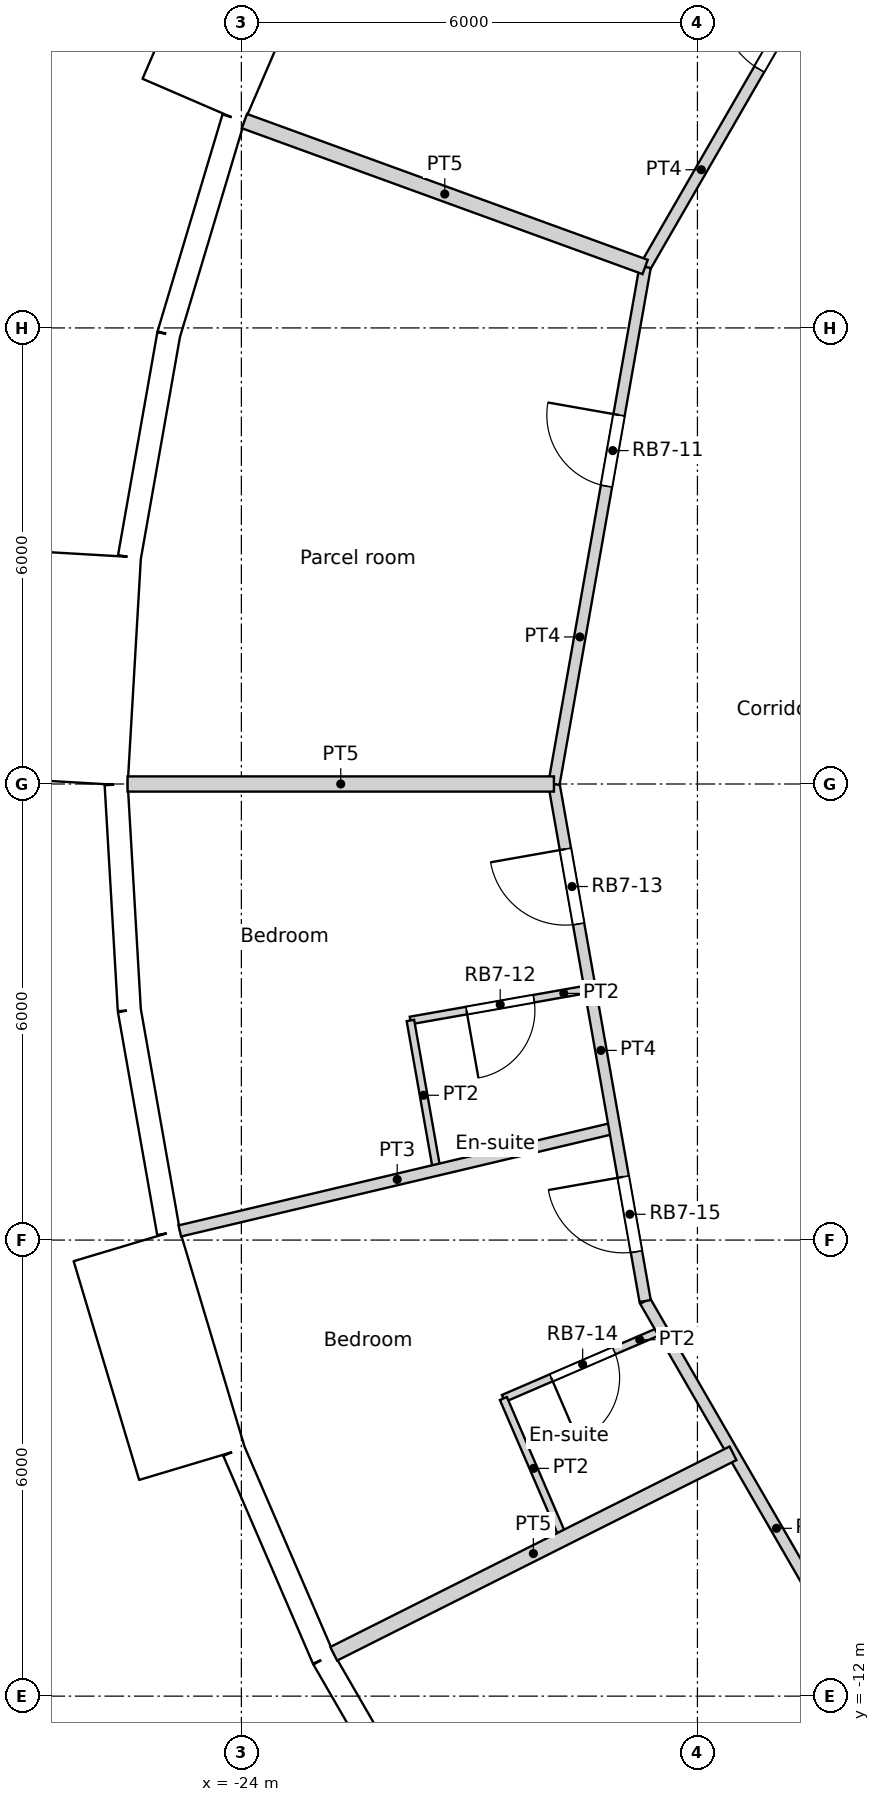
"""IFC4 building model, lengths in metres.
Left out: names, types, materials, properties, quantities, classifications, styles, units other than length and angle.
Written with IfcOpenShell. Run it as: python <this file> out.ifc"""

import sys

from ifc_helpers import new_model, si_unit, direction, frame, frame_2d, origin, origin_2d, place, context, subcontext, project, spatial, rectangle, circle, extrude, element, fill, save


model = new_model("IFC4")
c1 = context("Model", 3, precision=1e-05, world=origin(), true_north=direction((0.0, 1.0)))
c2 = subcontext(c1, "Body", "Model", "MODEL_VIEW")
j1 = project(units=[si_unit("LENGTHUNIT", "METRE"), si_unit("PLANEANGLEUNIT", "RADIAN")], contexts=[c1])
p1 = place(None, origin())
s1 = spatial("IfcSite", under=j1, at=p1, CompositionType="ELEMENT")
p2 = place(p1, origin())
s2 = spatial("IfcBuilding", under=s1, at=p2, CompositionType="ELEMENT")
p3 = place(p2, frame((0.0, 0.0, 190.8)))
s3 = spatial("IfcBuildingStorey", under=s2, at=p3, CompositionType="ELEMENT", Elevation=190.8)
for number, where, z_axis, x_axis in (
    (1, (-23.067, 8.396, 0.0), (0.0, 0.0, 1.0), (1.0, 0.0, 0.0)),
    (2, (-24.382, 2.85, 0.0), (0.0, 0.0, 1.0), (1.0, 0.0, 0.0)),
    (3, (-24.382, -2.85, 0.0), (0.0, 0.0, 1.0), (1.0, 0.0, 0.0)),
    (4, (-23.067, -8.396, 0.0), (0.0, 0.0, 1.0), (1.0, 0.0, 0.0)),
):
    element("IfcColumn", number, at=place(p3, frame(where, z_axis=z_axis, x_axis=x_axis)), inside=s3, PredefinedType="COLUMN", context=c2, shape_type="SweptSolid", body=[
        extrude(circle(Radius=0.6, at=origin_2d()), origin(), (0.0, 0.0, 1.0), 3.6),
    ])
for number, where, z_axis, x_axis in (
    (5, (-16.958, 8.167, 0.0), (0.0, 0.0, 1.0), (1.0, 0.0, 0.0)),
    (6, (-18.612, 2.805, 0.0), (0.0, 0.0, 1.0), (1.0, 0.0, 0.0)),
    (7, (-18.612, -2.805, 0.0), (0.0, 0.0, 1.0), (1.0, 0.0, 0.0)),
    (8, (-16.958, -8.167, 0.0), (0.0, 0.0, 1.0), (1.0, 0.0, 0.0)),
):
    element("IfcColumn", number, at=place(p3, frame(where, z_axis=z_axis, x_axis=x_axis)), inside=s3, PredefinedType="COLUMN", context=c2, shape_type="SweptSolid", body=[
        extrude(circle(Radius=0.65, at=origin_2d()), origin(), (0.0, 0.0, 1.0), 3.6),
    ])
p4 = place(p3, frame((-23.444, 11.746, -0.3), z_axis=(0.0, 0.0, 1.0), x_axis=(-0.396079003245, -0.918216435917, 0.0)))
e9 = element("IfcWall", 9, at=p4, inside=s3, PredefinedType="ELEMENTEDWALL", context=c2, shape_type="SweptSolid", body=[
    extrude(rectangle(XDim=3.0, YDim=1.45, at=frame_2d((1.5, 0.0))), origin(), (0.0, 0.0, 1.0), 3.6),
])
p5 = place(p4, frame((1.5, 0.0, 1.85)))
e10 = element("IfcOpeningElement", 10, at=p5, cuts=e9, PredefinedType="OPENING", context=c2, shape_type="SweptSolid", body=[
    extrude(circle(Radius=0.9, at=origin_2d()), frame((0.0, 0.735, 0.0), z_axis=(0.0, -1.0, 0.0), x_axis=(1.0, 0.0, 0.0)), (0.0, 0.0, 1.0), 1.47),
])
p6 = place(p3, frame((-24.104, 8.763, 0.0), z_axis=(0.0, 0.0, 1.0), x_axis=(-0.286782750849, -0.957995643944, 0.0)))
e11 = element("IfcWall", 11, at=p6, inside=s3, PredefinedType="SOLIDWALL", context=c2, shape_type="SweptSolid", body=[
    extrude(rectangle(XDim=2.973, YDim=0.3, at=frame_2d((1.486, 0.0))), origin(), (0.0, 0.0, 1.0), 2.8),
])
p7 = place(p6, frame((1.486, 0.0, 1.55)))
e12 = element("IfcOpeningElement", 12, at=p7, cuts=e11, PredefinedType="OPENING", context=c2, shape_type="SweptSolid", body=[
    extrude(circle(Radius=0.9, at=origin_2d()), frame((0.0, 0.16, 0.0), z_axis=(0.0, -1.0, 0.0), x_axis=(1.0, 0.0, 0.0)), (0.0, 0.0, 1.0), 0.32),
])
p8 = place(p3, frame((-24.956, 5.915, 0.0), z_axis=(0.0, 0.0, 1.0), x_axis=(-0.173686952598, -0.984800915159, 0.0)))
e13 = element("IfcWall", 13, at=p8, inside=s3, PredefinedType="SOLIDWALL", context=c2, shape_type="SweptSolid", body=[
    extrude(rectangle(XDim=2.973, YDim=0.3, at=frame_2d((1.486, 0.0))), origin(), (0.0, 0.0, 1.0), 3.3),
])
p9 = place(p8, frame((1.486, 0.0, 1.55)))
e14 = element("IfcOpeningElement", 14, at=p9, cuts=e13, PredefinedType="OPENING", context=c2, shape_type="SweptSolid", body=[
    extrude(circle(Radius=0.9, at=origin_2d()), frame((0.0, 0.16, 0.0), z_axis=(0.0, -1.0, 0.0), x_axis=(1.0, 0.0, 0.0)), (0.0, 0.0, 1.0), 0.32),
])
p10 = place(p3, frame((-26.048, 3.02, -0.3), z_axis=(0.0, 0.0, 1.0), x_axis=(-0.058106596105, -0.998310384344, 0.0)))
e15 = element("IfcWall", 15, at=p10, inside=s3, PredefinedType="ELEMENTEDWALL", context=c2, shape_type="SweptSolid", body=[
    extrude(rectangle(XDim=3.0, YDim=1.45, at=frame_2d((1.5, 0.0))), origin(), (0.0, 0.0, 1.0), 3.6),
])
p11 = place(p10, frame((1.5, 0.0, 1.85)))
e16 = element("IfcOpeningElement", 16, at=p11, cuts=e15, PredefinedType="OPENING", context=c2, shape_type="SweptSolid", body=[
    extrude(circle(Radius=0.9, at=origin_2d()), frame((0.0, 0.735, 0.0), z_axis=(0.0, -1.0, 0.0), x_axis=(1.0, 0.0, 0.0)), (0.0, 0.0, 1.0), 1.47),
])
p12 = place(p3, frame((-25.647, -0.01, 0.0), z_axis=(0.0, 0.0, 1.0), x_axis=(0.058139540521, -0.998308466271, 0.0)))
e17 = element("IfcWall", 17, at=p12, inside=s3, PredefinedType="SOLIDWALL", context=c2, shape_type="SweptSolid", body=[
    extrude(rectangle(XDim=2.973, YDim=0.3, at=frame_2d((1.487, 0.0))), origin(), (0.0, 0.0, 1.0), 2.8),
])
p13 = place(p12, frame((1.486, 0.0, 1.55)))
e18 = element("IfcOpeningElement", 18, at=p13, cuts=e17, PredefinedType="OPENING", context=c2, shape_type="SweptSolid", body=[
    extrude(circle(Radius=0.9, at=origin_2d()), frame((0.0, 0.16, 0.0), z_axis=(0.0, -1.0, 0.0), x_axis=(1.0, 0.0, 0.0)), (0.0, 0.0, 1.0), 0.32),
])
p14 = place(p3, frame((-25.474, -2.978, 0.0), z_axis=(0.0, 0.0, 1.0), x_axis=(0.173686952598, -0.984800915159, 0.0)))
e19 = element("IfcWall", 19, at=p14, inside=s3, PredefinedType="SOLIDWALL", context=c2, shape_type="SweptSolid", body=[
    extrude(rectangle(XDim=2.973, YDim=0.3, at=frame_2d((1.486, 0.0))), origin(), (0.0, 0.0, 1.0), 3.3),
])
p15 = place(p14, frame((1.486, 0.0, 1.55)))
e20 = element("IfcOpeningElement", 20, at=p15, cuts=e19, PredefinedType="OPENING", context=c2, shape_type="SweptSolid", body=[
    extrude(circle(Radius=0.9, at=origin_2d()), frame((0.0, 0.16, 0.0), z_axis=(0.0, -1.0, 0.0), x_axis=(1.0, 0.0, 0.0)), (0.0, 0.0, 1.0), 0.32),
])
p16 = place(p3, frame((-25.51, -6.071, -0.3), z_axis=(0.0, 0.0, 1.0), x_axis=(0.286780420304, -0.957996341606, 0.0)))
e21 = element("IfcWall", 21, at=p16, inside=s3, PredefinedType="ELEMENTEDWALL", context=c2, shape_type="SweptSolid", body=[
    extrude(rectangle(XDim=3.0, YDim=1.45, at=frame_2d((1.5, 0.0))), origin(), (0.0, 0.0, 1.0), 3.6),
])
p17 = place(p16, frame((1.5, 0.0, 1.85)))
e22 = element("IfcOpeningElement", 22, at=p17, cuts=e21, PredefinedType="OPENING", context=c2, shape_type="SweptSolid", body=[
    extrude(circle(Radius=0.9, at=origin_2d()), frame((0.0, 0.735, 0.0), z_axis=(0.0, -1.0, 0.0), x_axis=(1.0, 0.0, 0.0)), (0.0, 0.0, 1.0), 1.47),
])
p18 = place(p3, frame((-24.097, -8.781, 0.0), z_axis=(0.0, 0.0, 1.0), x_axis=(0.396078892785, -0.918216483565, 0.0)))
e23 = element("IfcWall", 23, at=p18, inside=s3, PredefinedType="SOLIDWALL", context=c2, shape_type="SweptSolid", body=[
    extrude(rectangle(XDim=2.973, YDim=0.3, at=frame_2d((1.486, 0.0))), origin(), (0.0, 0.0, 1.0), 2.8),
])
p19 = place(p18, frame((1.486, 0.0, 1.55)))
e24 = element("IfcOpeningElement", 24, at=p19, cuts=e23, PredefinedType="OPENING", context=c2, shape_type="SweptSolid", body=[
    extrude(circle(Radius=0.9, at=origin_2d()), frame((0.0, 0.16, 0.0), z_axis=(0.0, -1.0, 0.0), x_axis=(1.0, 0.0, 0.0)), (0.0, 0.0, 1.0), 0.32),
])
p20 = place(p3, frame((-22.919, -11.51, 0.0), z_axis=(0.0, 0.0, 1.0), x_axis=(0.500016263033, -0.866016014115, 0.0)))
e25 = element("IfcWall", 25, at=p20, inside=s3, PredefinedType="SOLIDWALL", context=c2, shape_type="SweptSolid", body=[
    extrude(rectangle(XDim=2.973, YDim=0.3, at=frame_2d((1.487, 0.0))), origin(), (0.0, 0.0, 1.0), 3.3),
])
p21 = place(p20, frame((1.486, 0.0, 1.55)))
e26 = element("IfcOpeningElement", 26, at=p21, cuts=e25, PredefinedType="OPENING", context=c2, shape_type="SweptSolid", body=[
    extrude(circle(Radius=0.9, at=origin_2d()), frame((0.0, 0.16, 0.0), z_axis=(0.0, -1.0, 0.0), x_axis=(1.0, 0.0, 0.0)), (0.0, 0.0, 1.0), 0.32),
])
p22 = place(p3, frame((-18.688, 6.802, 0.0), z_axis=(0.0, 0.0, 1.0), x_axis=(0.499914202267, 0.866074933462, 0.0)))
e27 = element("IfcWall", 27, at=p22, inside=s3, PredefinedType="PARTITIONING", context=c2, shape_type="SweptSolid", body=[
    extrude(rectangle(XDim=6.907, YDim=0.15, at=frame_2d((3.454, 0.0))), origin(), (0.0, 0.0, 1.0), 3.3),
])
p23 = place(p22, frame((3.004, 0.0, 0.0)))
e28 = element("IfcOpeningElement", 28, at=p23, cuts=e27, PredefinedType="OPENING", context=c2, shape_type="SweptSolid", body=[
    extrude(rectangle(XDim=1.0, YDim=2.04, at=frame_2d((0.5, 1.02))), frame((0.0, 0.075, 0.0), z_axis=(0.0, -1.0, 0.0), x_axis=(1.0, 0.0, 0.0)), (0.0, 0.0, 1.0), 0.15),
])
p24 = place(p3, frame((-19.888, 0.0, 0.0), z_axis=(0.0, 0.0, 1.0), x_axis=(0.173728873845, 0.98479352069, 0.0)))
e29 = element("IfcWall", 29, at=p24, inside=s3, PredefinedType="PARTITIONING", context=c2, shape_type="SweptSolid", body=[
    extrude(rectangle(XDim=6.907, YDim=0.15, at=frame_2d((3.454, 0.0))), origin(), (0.0, 0.0, 1.0), 3.3),
])
p25 = place(p24, frame((3.979, 0.0, 0.0)))
e30 = element("IfcOpeningElement", 30, at=p25, cuts=e29, PredefinedType="OPENING", context=c2, shape_type="SweptSolid", body=[
    extrude(rectangle(XDim=0.95, YDim=2.1, at=frame_2d((0.475, 1.05))), frame((0.0, 0.075, 0.0), z_axis=(0.0, -1.0, 0.0), x_axis=(1.0, 0.0, 0.0)), (0.0, 0.0, 1.0), 0.15),
])
p26 = place(p3, frame((-19.888, 0.0, 0.0), z_axis=(0.0, 0.0, 1.0), x_axis=(0.173728873845, -0.98479352069, 0.0)))
e31 = element("IfcWall", 31, at=p26, inside=s3, PredefinedType="PARTITIONING", context=c2, shape_type="SweptSolid", body=[
    extrude(rectangle(XDim=6.907, YDim=0.15, at=frame_2d((3.454, 0.0))), origin(), (0.0, 0.0, 1.0), 3.3),
])
p27 = place(p26, frame((0.87, 0.0, 0.0)))
e32 = element("IfcOpeningElement", 32, at=p27, cuts=e31, PredefinedType="OPENING", context=c2, shape_type="SweptSolid", body=[
    extrude(rectangle(XDim=1.0, YDim=2.1, at=frame_2d((0.5, 1.05))), frame((0.0, 0.075, 0.0), z_axis=(0.0, -1.0, 0.0), x_axis=(1.0, 0.0, 0.0)), (0.0, 0.0, 1.0), 0.15),
])
p28 = place(p26, frame((5.248, 0.0, 0.0)))
e33 = element("IfcOpeningElement", 33, at=p28, cuts=e31, PredefinedType="OPENING", context=c2, shape_type="SweptSolid", body=[
    extrude(rectangle(XDim=1.0, YDim=2.1, at=frame_2d((0.5, 1.05))), frame((0.0, 0.075, 0.0), z_axis=(0.0, -1.0, 0.0), x_axis=(1.0, 0.0, 0.0)), (0.0, 0.0, 1.0), 0.15),
])
p29 = place(p3, frame((-18.688, -6.802, 0.0), z_axis=(0.0, 0.0, 1.0), x_axis=(0.500229307554, -0.865892972523, 0.0)))
e34 = element("IfcWall", 34, at=p29, inside=s3, PredefinedType="PARTITIONING", context=c2, shape_type="SweptSolid", body=[
    extrude(rectangle(XDim=6.907, YDim=0.15, at=frame_2d((3.454, 0.0))), origin(), (0.0, 0.0, 1.0), 3.3),
])
p30 = place(p3, frame((-23.96, 8.721, 0.0), z_axis=(0.0, 0.0, 1.0), x_axis=(0.939686652043, -0.342036541866, 0.0)))
e35 = element("IfcWall", 35, at=p30, inside=s3, PredefinedType="PARTITIONING", context=c2, shape_type="SweptSolid", body=[
    extrude(rectangle(XDim=5.61, YDim=0.2, at=frame_2d((2.805, 0.0))), origin(), (0.0, 0.0, 1.0), 3.3),
])
p31 = place(p3, frame((-25.497, 0.0, 0.0), z_axis=(0.0, 0.0, 1.0), x_axis=(1.0, 0.0, 0.0)))
e36 = element("IfcWall", 36, at=p31, inside=s3, PredefinedType="PARTITIONING", context=c2, shape_type="SweptSolid", body=[
    extrude(rectangle(XDim=5.609, YDim=0.2, at=frame_2d((2.805, 0.0))), origin(), (0.0, 0.0, 1.0), 3.3),
])
p32 = place(p3, frame((-21.776, -3.111, 0.0), z_axis=(0.0, 0.0, 1.0), x_axis=(0.984781509998, 0.173796943488, 0.0)))
e37 = element("IfcWall", 37, at=p32, inside=s3, PredefinedType="PARTITIONING", context=c2, shape_type="SweptSolid", body=[
    extrude(rectangle(XDim=2.399, YDim=0.1, at=frame_2d((1.2, 0.0))), origin(), (0.0, 0.0, 1.0), 3.3),
])
p33 = place(p32, frame((0.75, 0.0, 0.0)))
e38 = element("IfcOpeningElement", 38, at=p33, cuts=e37, PredefinedType="OPENING", context=c2, shape_type="SweptSolid", body=[
    extrude(rectangle(XDim=0.9, YDim=2.04, at=frame_2d((0.45, 1.02))), frame((0.0, 0.05, 0.0), z_axis=(0.0, -1.0, 0.0), x_axis=(1.0, 0.0, 0.0)), (0.0, 0.0, 1.0), 0.1),
])
p34 = place(p3, frame((-21.776, -3.111, 0.0), z_axis=(0.0, 0.0, 1.0), x_axis=(0.17360412522, -0.984815519631, 0.0)))
e39 = element("IfcWall", 39, at=p34, inside=s3, PredefinedType="PARTITIONING", context=c2, shape_type="SweptSolid", body=[
    extrude(rectangle(XDim=1.998, YDim=0.1, at=frame_2d((0.999, 0.0))), origin(), (0.0, 0.0, 1.0), 3.3),
])
p35 = place(p3, frame((-24.81, -5.88, 0.0), z_axis=(0.0, 0.0, 1.0), x_axis=(0.973072933953, 0.230497429938, 0.0)))
e40 = element("IfcWall", 40, at=p35, inside=s3, PredefinedType="PARTITIONING", context=c2, shape_type="SweptSolid", body=[
    extrude(rectangle(XDim=5.878, YDim=0.15, at=frame_2d((2.939, 0.0))), origin(), (0.0, 0.0, 1.0), 3.3),
])
p36 = place(p3, frame((-20.553, -8.084, 0.0), z_axis=(0.0, 0.0, 1.0), x_axis=(0.918353723737, 0.395760581789, 0.0)))
e41 = element("IfcWall", 41, at=p36, inside=s3, PredefinedType="PARTITIONING", context=c2, shape_type="SweptSolid", body=[
    extrude(rectangle(XDim=2.271, YDim=0.1, at=frame_2d((1.136, 0.0))), origin(), (0.0, 0.0, 1.0), 3.3),
])
p37 = place(p36, frame((0.686, 0.0, 0.0)))
e42 = element("IfcOpeningElement", 42, at=p37, cuts=e41, PredefinedType="OPENING", context=c2, shape_type="SweptSolid", body=[
    extrude(rectangle(XDim=0.9, YDim=2.04, at=frame_2d((0.45, 1.02))), frame((0.0, 0.05, 0.0), z_axis=(0.0, -1.0, 0.0), x_axis=(1.0, 0.0, 0.0)), (0.0, 0.0, 1.0), 0.1),
])
p38 = place(p3, frame((-20.553, -8.084, 0.0), z_axis=(0.0, 0.0, 1.0), x_axis=(0.395756708969, -0.918355392703, 0.0)))
e43 = element("IfcWall", 43, at=p38, inside=s3, PredefinedType="PARTITIONING", context=c2, shape_type="SweptSolid", body=[
    extrude(rectangle(XDim=2.004, YDim=0.1, at=frame_2d((1.002, 0.0))), origin(), (0.0, 0.0, 1.0), 3.3),
])
p39 = place(p3, frame((-22.785, -11.443, 0.0), z_axis=(0.0, 0.0, 1.0), x_axis=(0.893644988933, 0.448774591254, 0.0)))
e44 = element("IfcWall", 44, at=p39, inside=s3, PredefinedType="PARTITIONING", context=c2, shape_type="SweptSolid", body=[
    extrude(rectangle(XDim=5.878, YDim=0.2, at=frame_2d((2.939, 0.0))), origin(), (0.0, 0.0, 1.0), 3.3),
])
p40 = place(p5, origin())
e45 = element("IfcWindow", 45, at=p40, inside=s3, PartitioningType="SINGLE_PANEL", PredefinedType="WINDOW", context=c2, shape_type="SweptSolid", body=[
    extrude(circle(Radius=0.9, at=origin_2d()), frame((0.0, 0.695, 0.0), z_axis=(0.0, -1.0, 0.0), x_axis=(1.0, 0.0, 0.0)), (0.0, 0.0, 1.0), 0.1),
])
fill(e10, e45)
p41 = place(p7, origin())
e46 = element("IfcWindow", 46, at=p41, inside=s3, PartitioningType="SINGLE_PANEL", PredefinedType="WINDOW", context=c2, shape_type="SweptSolid", body=[
    extrude(circle(Radius=0.9, at=origin_2d()), frame((0.0, 0.12, 0.0), z_axis=(0.0, -1.0, 0.0), x_axis=(1.0, 0.0, 0.0)), (0.0, 0.0, 1.0), 0.1),
])
fill(e12, e46)
p42 = place(p9, origin())
e47 = element("IfcWindow", 47, at=p42, inside=s3, PartitioningType="SINGLE_PANEL", PredefinedType="WINDOW", context=c2, shape_type="SweptSolid", body=[
    extrude(circle(Radius=0.9, at=origin_2d()), frame((0.0, 0.12, 0.0), z_axis=(0.0, -1.0, 0.0), x_axis=(1.0, 0.0, 0.0)), (0.0, 0.0, 1.0), 0.1),
])
fill(e14, e47)
p43 = place(p11, origin())
e48 = element("IfcWindow", 48, at=p43, inside=s3, PartitioningType="SINGLE_PANEL", PredefinedType="WINDOW", context=c2, shape_type="SweptSolid", body=[
    extrude(circle(Radius=0.9, at=origin_2d()), frame((0.0, 0.695, 0.0), z_axis=(0.0, -1.0, 0.0), x_axis=(1.0, 0.0, 0.0)), (0.0, 0.0, 1.0), 0.1),
])
fill(e16, e48)
p44 = place(p13, origin())
e49 = element("IfcWindow", 49, at=p44, inside=s3, PartitioningType="SINGLE_PANEL", PredefinedType="WINDOW", context=c2, shape_type="SweptSolid", body=[
    extrude(circle(Radius=0.9, at=origin_2d()), frame((0.0, 0.12, 0.0), z_axis=(0.0, -1.0, 0.0), x_axis=(1.0, 0.0, 0.0)), (0.0, 0.0, 1.0), 0.1),
])
fill(e18, e49)
p45 = place(p15, origin())
e50 = element("IfcWindow", 50, at=p45, inside=s3, PartitioningType="SINGLE_PANEL", PredefinedType="WINDOW", context=c2, shape_type="SweptSolid", body=[
    extrude(circle(Radius=0.9, at=origin_2d()), frame((0.0, 0.12, 0.0), z_axis=(0.0, -1.0, 0.0), x_axis=(1.0, 0.0, 0.0)), (0.0, 0.0, 1.0), 0.1),
])
fill(e20, e50)
p46 = place(p17, origin())
e51 = element("IfcWindow", 51, at=p46, inside=s3, PartitioningType="SINGLE_PANEL", PredefinedType="WINDOW", context=c2, shape_type="SweptSolid", body=[
    extrude(circle(Radius=0.9, at=origin_2d()), frame((0.0, 0.695, 0.0), z_axis=(0.0, -1.0, 0.0), x_axis=(1.0, 0.0, 0.0)), (0.0, 0.0, 1.0), 0.1),
])
fill(e22, e51)
p47 = place(p19, origin())
e52 = element("IfcWindow", 52, at=p47, inside=s3, PartitioningType="SINGLE_PANEL", PredefinedType="WINDOW", context=c2, shape_type="SweptSolid", body=[
    extrude(circle(Radius=0.9, at=origin_2d()), frame((0.0, 0.12, 0.0), z_axis=(0.0, -1.0, 0.0), x_axis=(1.0, 0.0, 0.0)), (0.0, 0.0, 1.0), 0.1),
])
fill(e24, e52)
p48 = place(p21, origin())
e53 = element("IfcWindow", 53, at=p48, inside=s3, PartitioningType="SINGLE_PANEL", PredefinedType="WINDOW", context=c2, shape_type="SweptSolid", body=[
    extrude(circle(Radius=0.9, at=origin_2d()), frame((0.0, 0.12, 0.0), z_axis=(0.0, -1.0, 0.0), x_axis=(1.0, 0.0, 0.0)), (0.0, 0.0, 1.0), 0.1),
])
fill(e26, e53)
p49 = place(p23, origin())
e54 = element("IfcDoor", 54, at=p49, inside=s3, OperationType="SINGLE_SWING_RIGHT", PredefinedType="DOOR", context=c2, shape_type="SweptSolid", body=[
    extrude(rectangle(XDim=1.0, YDim=2.04, at=frame_2d((0.5, 1.02))), frame((0.0, 0.025, 0.0), z_axis=(0.0, -1.0, 0.0), x_axis=(1.0, 0.0, 0.0)), (0.0, 0.0, 1.0), 0.05),
])
fill(e28, e54)
p50 = place(p25, origin())
e55 = element("IfcDoor", 55, at=p50, inside=s3, OperationType="SINGLE_SWING_RIGHT", PredefinedType="DOOR", context=c2, shape_type="SweptSolid", body=[
    extrude(rectangle(XDim=0.95, YDim=2.1, at=frame_2d((0.475, 1.05))), frame((0.0, 0.025, 0.0), z_axis=(0.0, -1.0, 0.0), x_axis=(1.0, 0.0, 0.0)), (0.0, 0.0, 1.0), 0.05),
])
fill(e30, e55)
p51 = place(p33, origin())
e56 = element("IfcDoor", 56, at=p51, inside=s3, OperationType="SINGLE_SWING_RIGHT", PredefinedType="DOOR", context=c2, shape_type="SweptSolid", body=[
    extrude(rectangle(XDim=0.9, YDim=2.04, at=frame_2d((0.45, 1.02))), frame((0.0, 0.025, 0.0), z_axis=(0.0, -1.0, 0.0), x_axis=(1.0, 0.0, 0.0)), (0.0, 0.0, 1.0), 0.05),
])
fill(e38, e56)
p52 = place(p27, origin())
e57 = element("IfcDoor", 57, at=p52, inside=s3, OperationType="SINGLE_SWING_RIGHT", PredefinedType="DOOR", context=c2, shape_type="SweptSolid", body=[
    extrude(rectangle(XDim=1.0, YDim=2.1, at=frame_2d((0.5, 1.05))), frame((0.0, 0.025, 0.0), z_axis=(0.0, -1.0, 0.0), x_axis=(1.0, 0.0, 0.0)), (0.0, 0.0, 1.0), 0.05),
])
fill(e32, e57)
p53 = place(p37, origin())
e58 = element("IfcDoor", 58, at=p53, inside=s3, OperationType="SINGLE_SWING_RIGHT", PredefinedType="DOOR", context=c2, shape_type="SweptSolid", body=[
    extrude(rectangle(XDim=0.9, YDim=2.04, at=frame_2d((0.45, 1.02))), frame((0.0, 0.025, 0.0), z_axis=(0.0, -1.0, 0.0), x_axis=(1.0, 0.0, 0.0)), (0.0, 0.0, 1.0), 0.05),
])
fill(e42, e58)
p54 = place(p28, origin())
e59 = element("IfcDoor", 59, at=p54, inside=s3, OperationType="SINGLE_SWING_RIGHT", PredefinedType="DOOR", context=c2, shape_type="SweptSolid", body=[
    extrude(rectangle(XDim=1.0, YDim=2.1, at=frame_2d((0.5, 1.05))), frame((0.0, 0.025, 0.0), z_axis=(0.0, -1.0, 0.0), x_axis=(1.0, 0.0, 0.0)), (0.0, 0.0, 1.0), 0.05),
])
fill(e33, e59)
save(model, sys.argv[1])
